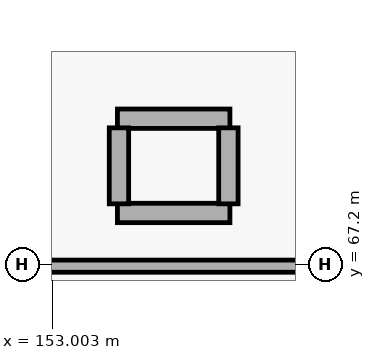
"""IFC4 building model, lengths in metres.
Left out: names, types, materials, properties, quantities, classifications, styles, units other than length and angle.
Written with IfcOpenShell. Run it as: python <this file> out.ifc"""

import sys

from ifc_helpers import new_model, si_unit, direction, frame, frame_2d, origin, place, context, subcontext, project, spatial, rectangle, extrude, element, save


model = new_model("IFC4")
c1 = context("Model", 3, precision=1e-05, world=origin(), true_north=direction((0.0, 1.0)))
c2 = subcontext(c1, "Body", "Model", "MODEL_VIEW")
j1 = project(units=[si_unit("LENGTHUNIT", "METRE"), si_unit("PLANEANGLEUNIT", "RADIAN")], contexts=[c1])
p1 = place(None, origin())
s1 = spatial("IfcSite", under=j1, at=p1, CompositionType="ELEMENT")
p2 = place(p1, origin())
s2 = spatial("IfcBuilding", under=s1, at=p2, CompositionType="ELEMENT")
p3 = place(p2, origin())
s3 = spatial("IfcBuildingStorey", under=s2, at=p3, CompositionType="ELEMENT", Elevation=0.0)
for number, where, z_axis, x_axis in (
    (1, (153.86, 69.12, 0.0), (0.0, 0.0, 1.0), (1.0, 0.0, 0.0)),
    (2, (153.86, 67.88, 0.0), (0.0, 0.0, 1.0), (1.0, 0.0, 0.0)),
):
    element("IfcWall", number, at=place(p3, frame(where, z_axis=z_axis, x_axis=x_axis)), inside=s3, PredefinedType="PARTITIONING", context=c2, shape_type="SweptSolid", body=[
        extrude(rectangle(XDim=1.48, YDim=0.255, at=frame_2d((0.74, 0.0))), origin(), (0.0, 0.0, 1.0), 4.77),
    ])
p4 = place(p3, frame((153.88, 68.0, 0.0), z_axis=(0.0, 0.0, 1.0), x_axis=(0.0, 1.0, 0.0)))
e3 = element("IfcWall", 3, at=p4, inside=s3, PredefinedType="PARTITIONING", context=c2, shape_type="SweptSolid", body=[
    extrude(rectangle(XDim=1.0, YDim=0.255, at=frame_2d((0.5, 0.0))), origin(), (0.0, 0.0, 1.0), 5.04),
])
p5 = place(p3, frame((155.32, 68.0, 0.0), z_axis=(0.0, 0.0, 1.0), x_axis=(0.0, 1.0, 0.0)))
e4 = element("IfcWall", 4, at=p5, inside=s3, PredefinedType="PARTITIONING", context=c2, shape_type="SweptSolid", body=[
    extrude(rectangle(XDim=1.0, YDim=0.255, at=frame_2d((0.5, 0.0))), origin(), (0.0, 0.0, 1.0), 4.77),
])
p6 = place(p3, frame((142.43, 67.18, 0.0), z_axis=(0.0, 0.0, 1.0), x_axis=(1.0, 0.0, 0.0)))
e5 = element("IfcWall", 5, at=p6, inside=s3, PredefinedType="PARTITIONING", context=c2, shape_type="SweptSolid", body=[
    extrude(rectangle(XDim=23.14, YDim=0.16, at=frame_2d((11.57, 0.0))), origin(), (0.0, 0.0, 1.0), 4.09),
])
p7 = place(p6, frame((2.65, 0.0, 0.0)))
e6 = element("IfcOpeningElement", 6, at=p7, cuts=e5, PredefinedType="OPENING", context=c2, shape_type="SweptSolid", body=[
    extrude(rectangle(XDim=1.36, YDim=2.36, at=frame_2d((0.68, 1.18))), frame((0.0, 0.09, 0.0), z_axis=(0.0, -1.0, 0.0), x_axis=(1.0, 0.0, 0.0)), (0.0, 0.0, 1.0), 0.18),
])
save(model, sys.argv[1])
